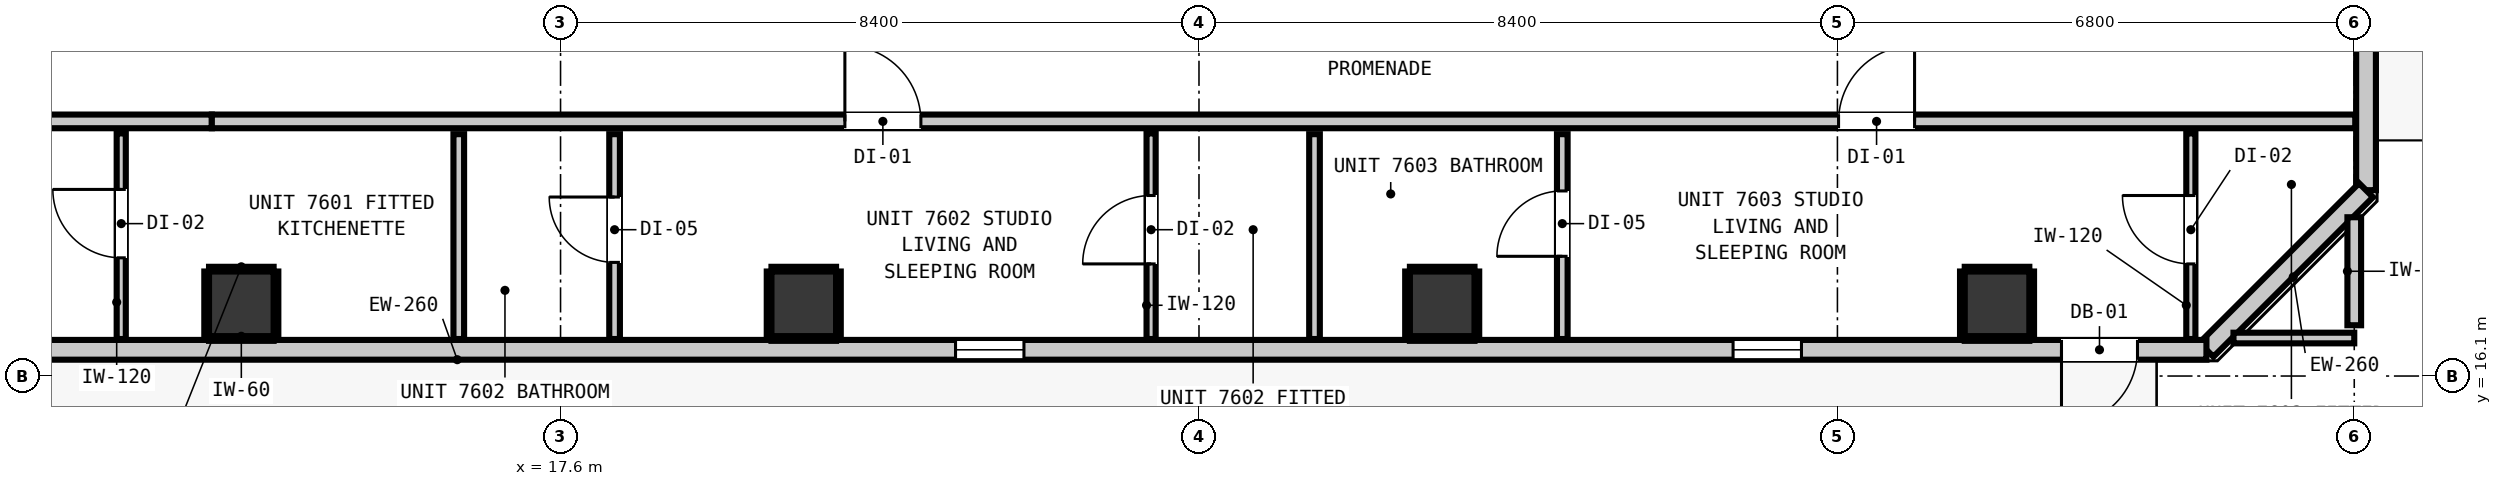
"""IFC4 building model, lengths in metres.
Left out: names, types, materials, properties, quantities, classifications, styles, units other than length and angle.
Written with IfcOpenShell. Run it as: python <this file> out.ifc"""

import sys

from ifc_helpers import new_model, si_unit, direction, frame, frame_2d, origin, origin_2d, place, context, subcontext, project, spatial, rectangle, extrude, element, fill, save


model = new_model("IFC4")
c1 = context("Model", 3, precision=1e-05, world=origin(), true_north=direction((0.0, 1.0)))
c2 = subcontext(c1, "Body", "Model", "MODEL_VIEW")
j1 = project(units=[si_unit("LENGTHUNIT", "METRE"), si_unit("PLANEANGLEUNIT", "RADIAN")], contexts=[c1])
p1 = place(None, origin())
s1 = spatial("IfcSite", under=j1, at=p1, CompositionType="ELEMENT")
p2 = place(p1, origin())
s2 = spatial("IfcBuilding", under=s1, at=p2, CompositionType="ELEMENT")
p3 = place(p2, frame((0.0, 0.0, 262.24)))
s3 = spatial("IfcBuildingStorey", under=s2, at=p3, CompositionType="ELEMENT", Elevation=262.24)
for number, where, z_axis, x_axis in (
    (1, (13.4, 17.05, 0.0), (0.0, 0.0, 1.0), (1.0, 0.0, 0.0)),
    (2, (20.8, 17.05, 0.0), (0.0, 0.0, 1.0), (1.0, 0.0, 0.0)),
    (3, (29.2, 17.05, 0.0), (0.0, 0.0, 1.0), (1.0, 0.0, 0.0)),
    (4, (36.5, 17.05, 0.0), (0.0, 0.0, 1.0), (1.0, 0.0, 0.0)),
):
    element("IfcColumn", number, at=place(p3, frame(where, z_axis=z_axis, x_axis=x_axis)), inside=s3, PredefinedType="COLUMN", context=c2, shape_type="SweptSolid", body=[
        extrude(rectangle(XDim=0.85, YDim=0.85, at=origin_2d()), origin(), (0.0, 0.0, 1.0), 3.32),
    ])
p4 = place(p3, frame((41.355, 48.855, 0.0), z_axis=(0.0, 0.0, 1.0), x_axis=(0.0, -1.0, 0.0)))
e5 = element("IfcWall", 5, at=p4, inside=s3, PredefinedType="STANDARD", context=c2, shape_type="SweptSolid", body=[
    extrude(rectangle(XDim=30.31, YDim=0.26, at=frame_2d((15.155, 0.0))), origin(), (0.0, 0.0, 1.0), 3.1),
])
p5 = place(p4, frame((0.91, 0.0, 0.0)))
e6 = element("IfcOpeningElement", 6, at=p5, cuts=e5, PredefinedType="OPENING", context=c2, shape_type="SweptSolid", body=[
    extrude(rectangle(XDim=1.0, YDim=2.15, at=frame_2d((0.5, 1.075))), frame((0.0, 0.14, 0.0), z_axis=(0.0, -1.0, 0.0), x_axis=(1.0, 0.0, 0.0)), (0.0, 0.0, 1.0), 0.28),
])
p6 = place(p4, frame((4.007, 0.0, 0.85)))
e7 = element("IfcOpeningElement", 7, at=p6, cuts=e5, PredefinedType="OPENING", context=c2, shape_type="SweptSolid", body=[
    extrude(rectangle(XDim=0.9, YDim=1.5, at=frame_2d((0.45, 0.75))), frame((0.0, 0.14, 0.0), z_axis=(0.0, -1.0, 0.0), x_axis=(1.0, 0.0, 0.0)), (0.0, 0.0, 1.0), 0.28),
])
p7 = place(p3, frame((41.355, 18.545, 0.0), z_axis=(0.0, 0.0, 1.0), x_axis=(-0.707147883682, -0.707065676302, 0.0)))
e8 = element("IfcWall", 8, at=p7, inside=s3, PredefinedType="STANDARD", context=c2, shape_type="SweptSolid", body=[
    extrude(rectangle(XDim=2.97, YDim=0.26, at=frame_2d((1.485, 0.0))), origin(), (0.0, 0.0, 1.0), 3.1),
])
p8 = place(p3, frame((39.255, 16.445, 0.0), z_axis=(0.0, 0.0, 1.0), x_axis=(-1.0, 0.0, 0.0)))
e9 = element("IfcWall", 9, at=p8, inside=s3, PredefinedType="STANDARD", context=c2, shape_type="SweptSolid", body=[
    extrude(rectangle(XDim=32.71, YDim=0.26, at=frame_2d((16.355, 0.0))), origin(), (0.0, 0.0, 1.0), 3.1),
])
p9 = place(p8, frame((0.907, 0.0, 0.0)))
e10 = element("IfcOpeningElement", 10, at=p9, cuts=e9, PredefinedType="OPENING", context=c2, shape_type="SweptSolid", body=[
    extrude(rectangle(XDim=1.0, YDim=2.15, at=frame_2d((0.5, 1.075))), frame((0.0, 0.14, 0.0), z_axis=(0.0, -1.0, 0.0), x_axis=(1.0, 0.0, 0.0)), (0.0, 0.0, 1.0), 0.28),
])
p10 = place(p8, frame((29.57, 0.0, 0.85)))
e11 = element("IfcOpeningElement", 11, at=p10, cuts=e9, PredefinedType="OPENING", context=c2, shape_type="SweptSolid", body=[
    extrude(rectangle(XDim=0.9, YDim=1.5, at=frame_2d((0.45, 0.75))), frame((0.0, 0.14, 0.0), z_axis=(0.0, -1.0, 0.0), x_axis=(1.0, 0.0, 0.0)), (0.0, 0.0, 1.0), 0.28),
])
p11 = place(p8, frame((15.558, 0.0, 0.85)))
e12 = element("IfcOpeningElement", 12, at=p11, cuts=e9, PredefinedType="OPENING", context=c2, shape_type="SweptSolid", body=[
    extrude(rectangle(XDim=0.9, YDim=1.5, at=frame_2d((0.45, 0.75))), frame((0.0, 0.14, 0.0), z_axis=(0.0, -1.0, 0.0), x_axis=(1.0, 0.0, 0.0)), (0.0, 0.0, 1.0), 0.28),
])
p12 = place(p8, frame((5.328, 0.0, 0.85)))
e13 = element("IfcOpeningElement", 13, at=p12, cuts=e9, PredefinedType="OPENING", context=c2, shape_type="SweptSolid", body=[
    extrude(rectangle(XDim=0.9, YDim=1.5, at=frame_2d((0.45, 0.75))), frame((0.0, 0.14, 0.0), z_axis=(0.0, -1.0, 0.0), x_axis=(1.0, 0.0, 0.0)), (0.0, 0.0, 1.0), 0.28),
])
p13 = place(p3, frame((5.388, 19.45, 0.0), z_axis=(0.0, 0.0, 1.0), x_axis=(1.0, 0.0, 0.0)))
e14 = element("IfcWall", 14, at=p13, inside=s3, PredefinedType="PARTITIONING", context=c2, shape_type="SweptSolid", body=[
    extrude(rectangle(XDim=7.624, YDim=0.18, at=frame_2d((3.812, 0.0))), origin(), (0.0, 0.0, 1.0), 2.477),
])
p14 = place(p13, frame((3.347, 0.0, 0.0)))
e15 = element("IfcOpeningElement", 15, at=p14, cuts=e14, PredefinedType="OPENING", context=c2, shape_type="SweptSolid", body=[
    extrude(rectangle(XDim=1.0, YDim=2.15, at=frame_2d((0.5, 1.075))), frame((0.0, 0.1, 0.0), z_axis=(0.0, -1.0, 0.0), x_axis=(1.0, 0.0, 0.0)), (0.0, 0.0, 1.0), 0.2),
])
p15 = place(p3, frame((13.012, 19.45, 0.0), z_axis=(0.0, 0.0, 1.0), x_axis=(1.0, 0.0, 0.0)))
e16 = element("IfcWall", 16, at=p15, inside=s3, PredefinedType="PARTITIONING", context=c2, shape_type="SweptSolid", body=[
    extrude(rectangle(XDim=28.201, YDim=0.18, at=frame_2d((14.101, 0.0))), origin(), (0.0, 0.0, 1.0), 3.1),
])
p16 = place(p15, frame((8.329, 0.0, 0.0)))
e17 = element("IfcOpeningElement", 17, at=p16, cuts=e16, PredefinedType="OPENING", context=c2, shape_type="SweptSolid", body=[
    extrude(rectangle(XDim=1.0, YDim=2.15, at=frame_2d((0.5, 1.075))), frame((0.0, 0.1, 0.0), z_axis=(0.0, -1.0, 0.0), x_axis=(1.0, 0.0, 0.0)), (0.0, 0.0, 1.0), 0.2),
])
p17 = place(p15, frame((21.403, 0.0, 0.0)))
e18 = element("IfcOpeningElement", 18, at=p17, cuts=e16, PredefinedType="OPENING", context=c2, shape_type="SweptSolid", body=[
    extrude(rectangle(XDim=1.0, YDim=2.15, at=frame_2d((0.5, 1.075))), frame((0.0, 0.1, 0.0), z_axis=(0.0, -1.0, 0.0), x_axis=(1.0, 0.0, 0.0)), (0.0, 0.0, 1.0), 0.2),
])
p18 = place(p3, frame((39.611, 16.6, 0.0), z_axis=(0.0, 0.0, 1.0), x_axis=(1.0, 0.0, 0.0)))
e19 = element("IfcWall", 19, at=p18, inside=s3, PredefinedType="PARTITIONING", context=c2, shape_type="SweptSolid", body=[
    extrude(rectangle(XDim=1.589, YDim=0.14, at=frame_2d((0.794, 0.0))), origin(), (0.0, 0.0, 1.0), 3.1),
])
p19 = place(p3, frame((41.2, 16.768, 0.0), z_axis=(0.0, 0.0, 1.0), x_axis=(0.0, 1.0, 0.0)))
e20 = element("IfcWall", 20, at=p19, inside=s3, PredefinedType="PARTITIONING", context=c2, shape_type="SweptSolid", body=[
    extrude(rectangle(XDim=1.421, YDim=0.18, at=frame_2d((0.71, 0.0))), origin(), (0.0, 0.0, 1.0), 3.1),
])
p20 = place(p3, frame((16.261, 16.587, 0.0), z_axis=(0.0, 0.0, 1.0), x_axis=(0.0, 1.0, 0.0)))
e21 = element("IfcWall", 21, at=p20, inside=s3, PredefinedType="PARTITIONING", context=c2, shape_type="SweptSolid", body=[
    extrude(rectangle(XDim=2.695, YDim=0.14, at=frame_2d((1.348, 0.0))), origin(), (0.0, 0.0, 1.0), 3.1),
])
p21 = place(p3, frame((18.311, 16.587, 0.0), z_axis=(0.0, 0.0, 1.0), x_axis=(0.0, 1.0, 0.0)))
e22 = element("IfcWall", 22, at=p21, inside=s3, PredefinedType="PARTITIONING", context=c2, shape_type="SweptSolid", body=[
    extrude(rectangle(XDim=2.695, YDim=0.14, at=frame_2d((1.348, 0.0))), origin(), (0.0, 0.0, 1.0), 3.1),
])
p22 = place(p21, frame((1.008, 0.0, 0.0)))
e23 = element("IfcOpeningElement", 23, at=p22, cuts=e22, PredefinedType="OPENING", context=c2, shape_type="SweptSolid", body=[
    extrude(rectangle(XDim=0.86, YDim=2.02, at=frame_2d((0.43, 1.01))), frame((0.0, 0.08, 0.0), z_axis=(0.0, -1.0, 0.0), x_axis=(1.0, 0.0, 0.0)), (0.0, 0.0, 1.0), 0.16),
])
p23 = place(p3, frame((27.52, 16.587, 0.0), z_axis=(0.0, 0.0, 1.0), x_axis=(0.0, 1.0, 0.0)))
e24 = element("IfcWall", 24, at=p23, inside=s3, PredefinedType="PARTITIONING", context=c2, shape_type="SweptSolid", body=[
    extrude(rectangle(XDim=2.695, YDim=0.14, at=frame_2d((1.348, 0.0))), origin(), (0.0, 0.0, 1.0), 3.1),
])
p24 = place(p3, frame((30.78, 16.587, 0.0), z_axis=(0.0, 0.0, 1.0), x_axis=(0.0, 1.0, 0.0)))
e25 = element("IfcWall", 25, at=p24, inside=s3, PredefinedType="PARTITIONING", context=c2, shape_type="SweptSolid", body=[
    extrude(rectangle(XDim=2.695, YDim=0.14, at=frame_2d((1.348, 0.0))), origin(), (0.0, 0.0, 1.0), 3.1),
])
p25 = place(p24, frame((1.088, 0.0, 0.0)))
e26 = element("IfcOpeningElement", 26, at=p25, cuts=e25, PredefinedType="OPENING", context=c2, shape_type="SweptSolid", body=[
    extrude(rectangle(XDim=0.86, YDim=2.02, at=frame_2d((0.43, 1.01))), frame((0.0, 0.08, 0.0), z_axis=(0.0, -1.0, 0.0), x_axis=(1.0, 0.0, 0.0)), (0.0, 0.0, 1.0), 0.16),
])
p26 = place(p3, frame((11.82, 16.587, 0.0), z_axis=(0.0, 0.0, 1.0), x_axis=(0.0, 1.0, 0.0)))
e27 = element("IfcWall", 27, at=p26, inside=s3, PredefinedType="PARTITIONING", context=c2, shape_type="SweptSolid", body=[
    extrude(rectangle(XDim=2.705, YDim=0.12, at=frame_2d((1.353, 0.0))), origin(), (0.0, 0.0, 1.0), 3.1),
])
p27 = place(p26, frame((1.068, 0.0, 0.0)))
e28 = element("IfcOpeningElement", 28, at=p27, cuts=e27, PredefinedType="OPENING", context=c2, shape_type="SweptSolid", body=[
    extrude(rectangle(XDim=0.9, YDim=2.1, at=frame_2d((0.45, 1.05))), frame((0.0, 0.07, 0.0), z_axis=(0.0, -1.0, 0.0), x_axis=(1.0, 0.0, 0.0)), (0.0, 0.0, 1.0), 0.14),
])
p28 = place(p3, frame((25.37, 16.587, 0.0), z_axis=(0.0, 0.0, 1.0), x_axis=(0.0, 1.0, 0.0)))
e29 = element("IfcWall", 29, at=p28, inside=s3, PredefinedType="PARTITIONING", context=c2, shape_type="SweptSolid", body=[
    extrude(rectangle(XDim=2.705, YDim=0.12, at=frame_2d((1.353, 0.0))), origin(), (0.0, 0.0, 1.0), 3.1),
])
p29 = place(p28, frame((0.988, 0.0, 0.0)))
e30 = element("IfcOpeningElement", 30, at=p29, cuts=e29, PredefinedType="OPENING", context=c2, shape_type="SweptSolid", body=[
    extrude(rectangle(XDim=0.9, YDim=2.1, at=frame_2d((0.45, 1.05))), frame((0.0, 0.07, 0.0), z_axis=(0.0, -1.0, 0.0), x_axis=(1.0, 0.0, 0.0)), (0.0, 0.0, 1.0), 0.14),
])
p30 = place(p3, frame((39.05, 16.587, 0.0), z_axis=(0.0, 0.0, 1.0), x_axis=(0.0, 1.0, 0.0)))
e31 = element("IfcWall", 31, at=p30, inside=s3, PredefinedType="PARTITIONING", context=c2, shape_type="SweptSolid", body=[
    extrude(rectangle(XDim=2.705, YDim=0.12, at=frame_2d((1.353, 0.0))), origin(), (0.0, 0.0, 1.0), 3.1),
])
p31 = place(p30, frame((0.988, 0.0, 0.0)))
e32 = element("IfcOpeningElement", 32, at=p31, cuts=e31, PredefinedType="OPENING", context=c2, shape_type="SweptSolid", body=[
    extrude(rectangle(XDim=0.9, YDim=2.1, at=frame_2d((0.45, 1.05))), frame((0.0, 0.07, 0.0), z_axis=(0.0, -1.0, 0.0), x_axis=(1.0, 0.0, 0.0)), (0.0, 0.0, 1.0), 0.14),
])
for number, where, z_axis, x_axis in (
    (33, (12.975, 16.593, 0.0), (0.0, 0.0, 1.0), (1.0, 0.0, 0.0)),
    (34, (12.975, 17.507, 0.0), (0.0, 0.0, 1.0), (1.0, 0.0, 0.0)),
):
    element("IfcWall", number, at=place(p3, frame(where, z_axis=z_axis, x_axis=x_axis)), inside=s3, PredefinedType="PARTITIONING", context=c2, shape_type="SweptSolid", body=[
        extrude(rectangle(XDim=0.85, YDim=0.06, at=frame_2d((0.425, 0.0))), origin(), (0.0, 0.0, 1.0), 1.45),
    ])
for number, where, z_axis, x_axis in (
    (35, (12.943, 16.625, 0.0), (0.0, 0.0, 1.0), (0.0, 1.0, 0.0)),
    (36, (13.857, 16.625, 0.0), (0.0, 0.0, 1.0), (0.0, 1.0, 0.0)),
    (37, (20.375, 16.593, 0.0), (0.0, 0.0, 1.0), (1.0, 0.0, 0.0)),
    (38, (20.375, 17.507, 0.0), (0.0, 0.0, 1.0), (1.0, 0.0, 0.0)),
    (39, (20.343, 16.625, 0.0), (0.0, 0.0, 1.0), (0.0, 1.0, 0.0)),
    (40, (21.257, 16.625, 0.0), (0.0, 0.0, 1.0), (0.0, 1.0, 0.0)),
    (41, (28.775, 16.593, 0.0), (0.0, 0.0, 1.0), (1.0, 0.0, 0.0)),
    (42, (28.775, 17.507, 0.0), (0.0, 0.0, 1.0), (1.0, 0.0, 0.0)),
    (43, (28.743, 16.625, 0.0), (0.0, 0.0, 1.0), (0.0, 1.0, 0.0)),
    (44, (29.657, 16.625, 0.0), (0.0, 0.0, 1.0), (0.0, 1.0, 0.0)),
    (45, (36.075, 16.593, 0.0), (0.0, 0.0, 1.0), (1.0, 0.0, 0.0)),
    (46, (36.075, 17.507, 0.0), (0.0, 0.0, 1.0), (1.0, 0.0, 0.0)),
    (47, (36.043, 16.625, 0.0), (0.0, 0.0, 1.0), (0.0, 1.0, 0.0)),
    (48, (36.957, 16.625, 0.0), (0.0, 0.0, 1.0), (0.0, 1.0, 0.0)),
):
    element("IfcWall", number, at=place(p3, frame(where, z_axis=z_axis, x_axis=x_axis)), inside=s3, PredefinedType="PARTITIONING", context=c2, shape_type="SweptSolid", body=[
        extrude(rectangle(XDim=0.85, YDim=0.06, at=frame_2d((0.425, 0.0))), origin(), (0.0, 0.0, 1.0), 1.45),
    ])
p32 = place(p9, origin())
e49 = element("IfcDoor", 49, at=p32, inside=s3, OperationType="SINGLE_SWING_RIGHT", PredefinedType="DOOR", context=c2, shape_type="SweptSolid", body=[
    extrude(rectangle(XDim=1.0, YDim=2.15, at=frame_2d((0.5, 1.075))), frame((0.0, 0.025, 0.0), z_axis=(0.0, -1.0, 0.0), x_axis=(1.0, 0.0, 0.0)), (0.0, 0.0, 1.0), 0.05),
])
fill(e10, e49)
p33 = place(p11, origin())
e50 = element("IfcWindow", 50, at=p33, inside=s3, PartitioningType="SINGLE_PANEL", PredefinedType="WINDOW", context=c2, shape_type="SweptSolid", body=[
    extrude(rectangle(XDim=0.9, YDim=1.5, at=frame_2d((0.45, 0.75))), frame((0.0, 0.03, 0.0), z_axis=(0.0, -1.0, 0.0), x_axis=(1.0, 0.0, 0.0)), (0.0, 0.0, 1.0), 0.06),
])
fill(e12, e50)
p34 = place(p12, origin())
e51 = element("IfcWindow", 51, at=p34, inside=s3, PartitioningType="SINGLE_PANEL", PredefinedType="WINDOW", context=c2, shape_type="SweptSolid", body=[
    extrude(rectangle(XDim=0.9, YDim=1.5, at=frame_2d((0.45, 0.75))), frame((0.0, 0.03, 0.0), z_axis=(0.0, -1.0, 0.0), x_axis=(1.0, 0.0, 0.0)), (0.0, 0.0, 1.0), 0.06),
])
fill(e13, e51)
p35 = place(p27, origin())
e52 = element("IfcDoor", 52, at=p35, inside=s3, OperationType="SINGLE_SWING_RIGHT", PredefinedType="DOOR", context=c2, shape_type="SweptSolid", body=[
    extrude(rectangle(XDim=0.9, YDim=2.1, at=frame_2d((0.45, 1.05))), frame((0.0, 0.025, 0.0), z_axis=(0.0, -1.0, 0.0), x_axis=(1.0, 0.0, 0.0)), (0.0, 0.0, 1.0), 0.05),
])
fill(e28, e52)
p36 = place(p16, origin())
e53 = element("IfcDoor", 53, at=p36, inside=s3, OperationType="SINGLE_SWING_LEFT", PredefinedType="DOOR", context=c2, shape_type="SweptSolid", body=[
    extrude(rectangle(XDim=1.0, YDim=2.15, at=frame_2d((0.5, 1.075))), frame((0.0, 0.025, 0.0), z_axis=(0.0, -1.0, 0.0), x_axis=(1.0, 0.0, 0.0)), (0.0, 0.0, 1.0), 0.05),
])
fill(e17, e53)
p37 = place(p22, origin())
e54 = element("IfcDoor", 54, at=p37, inside=s3, OperationType="SINGLE_SWING_RIGHT", PredefinedType="DOOR", context=c2, shape_type="SweptSolid", body=[
    extrude(rectangle(XDim=0.86, YDim=2.02, at=frame_2d((0.43, 1.01))), frame((0.0, 0.025, 0.0), z_axis=(0.0, -1.0, 0.0), x_axis=(1.0, 0.0, 0.0)), (0.0, 0.0, 1.0), 0.05),
])
fill(e23, e54)
p38 = place(p29, origin())
e55 = element("IfcDoor", 55, at=p38, inside=s3, OperationType="SINGLE_SWING_LEFT", PredefinedType="DOOR", context=c2, shape_type="SweptSolid", body=[
    extrude(rectangle(XDim=0.9, YDim=2.1, at=frame_2d((0.45, 1.05))), frame((0.0, 0.025, 0.0), z_axis=(0.0, -1.0, 0.0), x_axis=(1.0, 0.0, 0.0)), (0.0, 0.0, 1.0), 0.05),
])
fill(e30, e55)
p39 = place(p17, origin())
e56 = element("IfcDoor", 56, at=p39, inside=s3, OperationType="SINGLE_SWING_RIGHT", PredefinedType="DOOR", context=c2, shape_type="SweptSolid", body=[
    extrude(rectangle(XDim=1.0, YDim=2.15, at=frame_2d((0.5, 1.075))), frame((0.0, 0.025, 0.0), z_axis=(0.0, -1.0, 0.0), x_axis=(1.0, 0.0, 0.0)), (0.0, 0.0, 1.0), 0.05),
])
fill(e18, e56)
p40 = place(p25, origin())
e57 = element("IfcDoor", 57, at=p40, inside=s3, OperationType="SINGLE_SWING_LEFT", PredefinedType="DOOR", context=c2, shape_type="SweptSolid", body=[
    extrude(rectangle(XDim=0.86, YDim=2.02, at=frame_2d((0.43, 1.01))), frame((0.0, 0.025, 0.0), z_axis=(0.0, -1.0, 0.0), x_axis=(1.0, 0.0, 0.0)), (0.0, 0.0, 1.0), 0.05),
])
fill(e26, e57)
p41 = place(p31, origin())
e58 = element("IfcDoor", 58, at=p41, inside=s3, OperationType="SINGLE_SWING_RIGHT", PredefinedType="DOOR", context=c2, shape_type="SweptSolid", body=[
    extrude(rectangle(XDim=0.9, YDim=2.1, at=frame_2d((0.45, 1.05))), frame((0.0, 0.025, 0.0), z_axis=(0.0, -1.0, 0.0), x_axis=(1.0, 0.0, 0.0)), (0.0, 0.0, 1.0), 0.05),
])
fill(e32, e58)
save(model, sys.argv[1])
